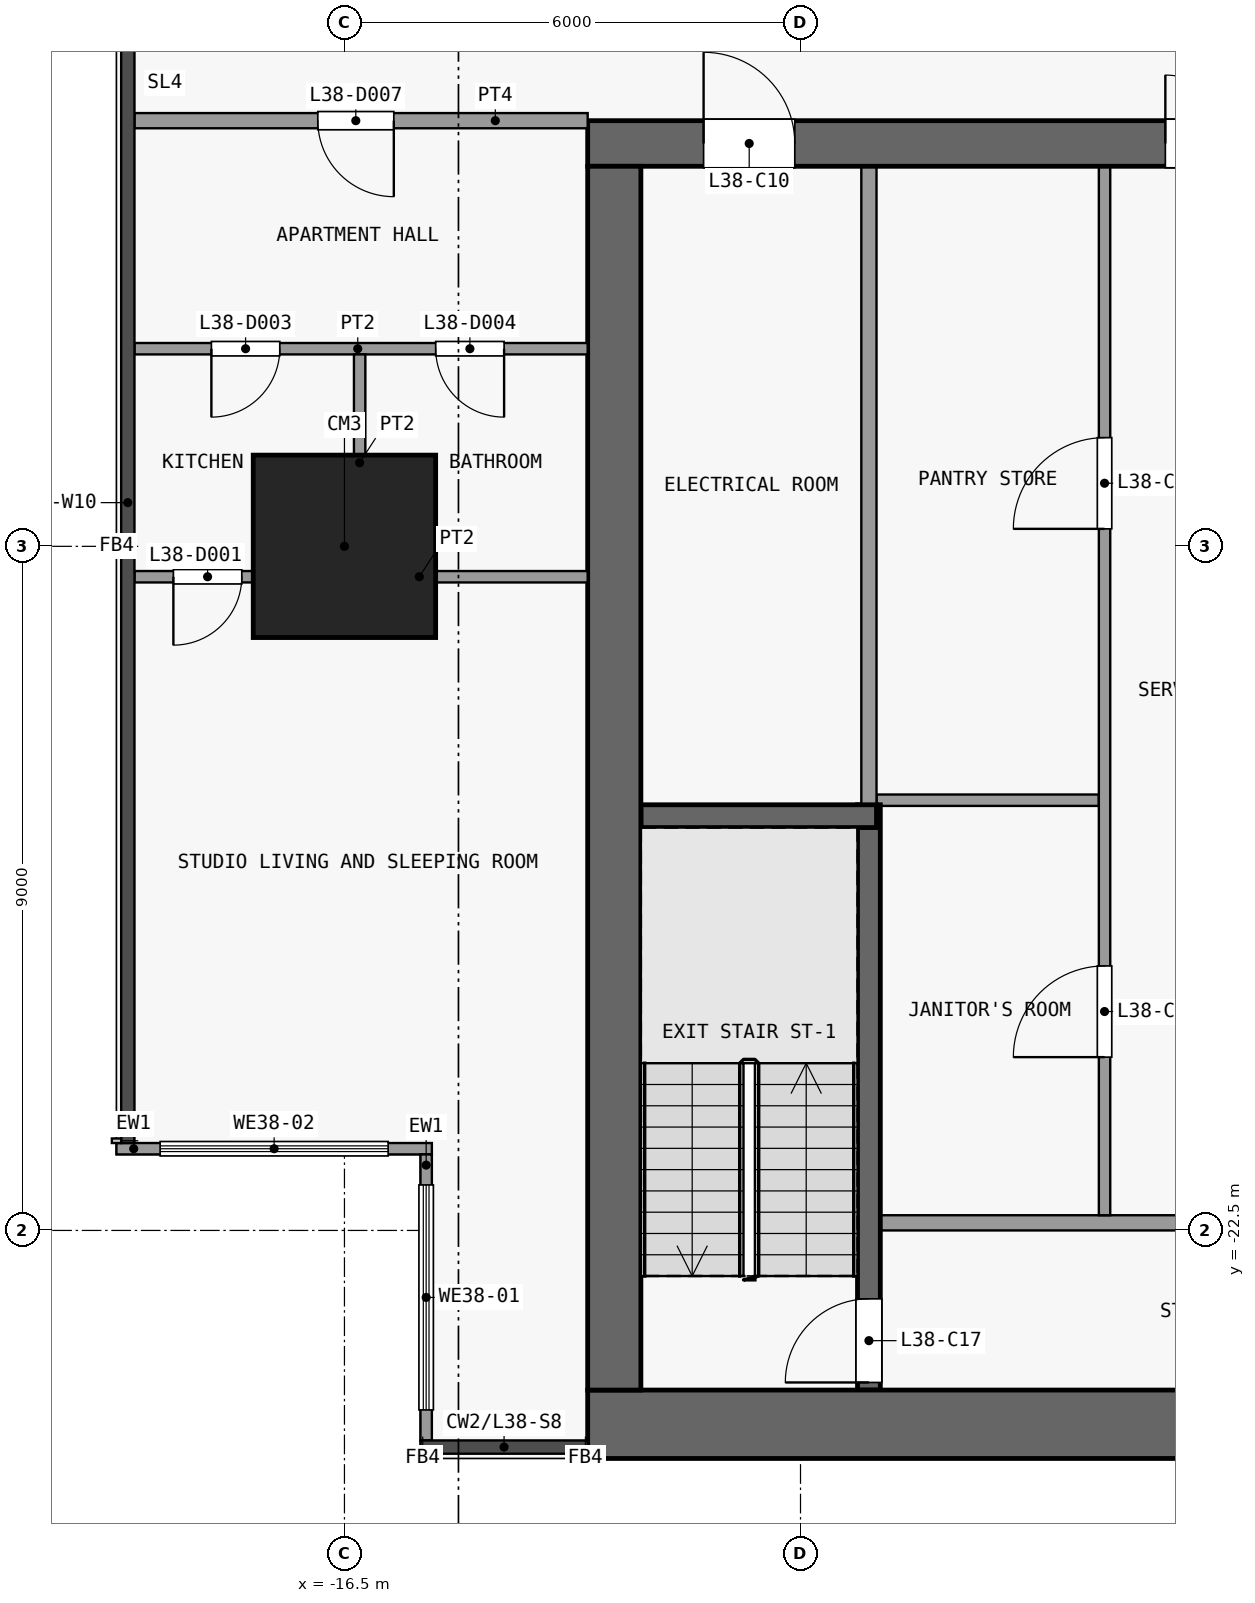
"""IFC4 building model, lengths in metres.
Left out: names, types, materials, properties, quantities, classifications, styles, units other than length and angle.
Written with IfcOpenShell. Run it as: python <this file> out.ifc"""

import sys

from ifc_helpers import new_model, si_unit, direction, frame, frame_2d, origin, origin_2d, place, context, subcontext, project, spatial, rectangle, extrude, element, fill, save


model = new_model("IFC4")
c1 = context("Model", 3, precision=1e-05, world=origin(), true_north=direction((0.0, 1.0)))
c2 = subcontext(c1, "Body", "Model", "MODEL_VIEW")
j1 = project(units=[si_unit("LENGTHUNIT", "METRE"), si_unit("PLANEANGLEUNIT", "RADIAN")], contexts=[c1])
p1 = place(None, origin())
s1 = spatial("IfcSite", under=j1, at=p1, CompositionType="ELEMENT")
p2 = place(p1, origin())
s2 = spatial("IfcBuilding", under=s1, at=p2, CompositionType="ELEMENT")
p3 = place(p2, frame((0.0, 0.0, 156.5)))
s3 = spatial("IfcBuildingStorey", under=s2, at=p3, CompositionType="ELEMENT", Elevation=156.5)
p4 = place(p3, frame((-16.5, -13.5, 0.0), z_axis=(0.0, 0.0, 1.0), x_axis=(1.0, 0.0, 0.0)))
e1 = element("IfcColumn", 1, at=p4, inside=s3, PredefinedType="COLUMN", context=c2, shape_type="SweptSolid", body=[
    extrude(rectangle(XDim=2.4, YDim=2.4, at=origin_2d()), origin(), (0.0, 0.0, 1.0), 3.6),
])
p5 = place(p3, frame((-13.3, -25.05, 0.0), z_axis=(0.0, 0.0, 1.0), x_axis=(1.0, 0.0, 0.0)))
e2 = element("IfcWall", 2, at=p5, inside=s3, PredefinedType="SHEAR", context=c2, shape_type="SweptSolid", body=[
    extrude(rectangle(XDim=26.6, YDim=0.9, at=frame_2d((13.3, 0.0))), origin(), (0.0, 0.0, 1.0), 3.3),
])
p6 = place(p3, frame((-13.3, -8.2, 0.0), z_axis=(0.0, 0.0, 1.0), x_axis=(1.0, 0.0, 0.0)))
e3 = element("IfcWall", 3, at=p6, inside=s3, PredefinedType="SHEAR", context=c2, shape_type="SweptSolid", body=[
    extrude(rectangle(XDim=26.6, YDim=0.6, at=frame_2d((13.3, 0.0))), origin(), (0.0, 0.0, 1.0), 3.3),
])
p7 = place(p6, frame((7.6, 0.0, 0.0)))
e4 = element("IfcOpeningElement", 4, at=p7, cuts=e3, PredefinedType="OPENING", context=c2, shape_type="SweptSolid", body=[
    extrude(rectangle(XDim=1.8, YDim=2.1, at=frame_2d((0.9, 1.05))), frame((0.0, 0.31, 0.0), z_axis=(0.0, -1.0, 0.0), x_axis=(1.0, 0.0, 0.0)), (0.0, 0.0, 1.0), 0.62),
])
p8 = place(p6, frame((17.2, 0.0, 0.0)))
e5 = element("IfcOpeningElement", 5, at=p8, cuts=e3, PredefinedType="OPENING", context=c2, shape_type="SweptSolid", body=[
    extrude(rectangle(XDim=1.8, YDim=2.1, at=frame_2d((0.9, 1.05))), frame((0.0, 0.31, 0.0), z_axis=(0.0, -1.0, 0.0), x_axis=(1.0, 0.0, 0.0)), (0.0, 0.0, 1.0), 0.62),
])
p9 = place(p6, frame((1.525, 0.0, 0.0)))
e6 = element("IfcOpeningElement", 6, at=p9, cuts=e3, PredefinedType="OPENING", context=c2, shape_type="SweptSolid", body=[
    extrude(rectangle(XDim=1.2, YDim=2.1, at=frame_2d((0.6, 1.05))), frame((0.0, 0.31, 0.0), z_axis=(0.0, -1.0, 0.0), x_axis=(1.0, 0.0, 0.0)), (0.0, 0.0, 1.0), 0.62),
])
p10 = place(p6, frame((23.175, 0.0, 0.0)))
e7 = element("IfcOpeningElement", 7, at=p10, cuts=e3, PredefinedType="OPENING", context=c2, shape_type="SweptSolid", body=[
    extrude(rectangle(XDim=0.9, YDim=2.1, at=frame_2d((0.45, 1.05))), frame((0.0, 0.31, 0.0), z_axis=(0.0, -1.0, 0.0), x_axis=(1.0, 0.0, 0.0)), (0.0, 0.0, 1.0), 0.62),
])
p11 = place(p3, frame((-12.95, -24.6, 0.0), z_axis=(0.0, 0.0, 1.0), x_axis=(0.0, 1.0, 0.0)))
e8 = element("IfcWall", 8, at=p11, inside=s3, PredefinedType="SHEAR", context=c2, shape_type="SweptSolid", body=[
    extrude(rectangle(XDim=16.1, YDim=0.7, at=frame_2d((8.05, 0.0))), origin(), (0.0, 0.0, 1.0), 3.3),
])
p12 = place(p3, frame((-3.25, -22.4, 0.0), z_axis=(0.0, 0.0, 1.0), x_axis=(-1.0, 0.0, 0.0)))
e9 = element("IfcWall", 9, at=p12, inside=s3, PredefinedType="PARTITIONING", context=c2, shape_type="SweptSolid", body=[
    extrude(rectangle(XDim=6.2, YDim=0.2, at=frame_2d((3.1, 0.0))), origin(), (0.0, 0.0, 1.0), 3.3),
])
p13 = place(p12, frame((0.8, 0.0, 0.0)))
e10 = element("IfcOpeningElement", 10, at=p13, cuts=e9, PredefinedType="OPENING", context=c2, shape_type="SweptSolid", body=[
    extrude(rectangle(XDim=1.5, YDim=2.1, at=frame_2d((0.75, 1.05))), frame((0.0, 0.11, 0.0), z_axis=(0.0, -1.0, 0.0), x_axis=(1.0, 0.0, 0.0)), (0.0, 0.0, 1.0), 0.22),
])
p14 = place(p3, frame((-12.6, -17.05, 0.0), z_axis=(0.0, 0.0, 1.0), x_axis=(1.0, 0.0, 0.0)))
e11 = element("IfcWall", 11, at=p14, inside=s3, PredefinedType="SHEAR", context=c2, shape_type="SweptSolid", body=[
    extrude(rectangle(XDim=3.1, YDim=0.3, at=frame_2d((1.55, 0.0))), origin(), (0.0, 0.0, 1.0), 3.3),
])
p15 = place(p3, frame((-9.5, -16.84, 0.0), z_axis=(0.0, 0.0, 1.0), x_axis=(1.0, 0.0, 0.0)))
e12 = element("IfcWall", 12, at=p15, inside=s3, PredefinedType="PARTITIONING", context=c2, shape_type="SweptSolid", body=[
    extrude(rectangle(XDim=2.925, YDim=0.15, at=frame_2d((1.462, 0.0))), origin(), (0.0, 0.0, 1.0), 3.3),
])
p16 = place(p3, frame((-9.6, -24.6, 0.0), z_axis=(0.0, 0.0, 1.0), x_axis=(0.0, 1.0, 0.0)))
e13 = element("IfcWall", 13, at=p16, inside=s3, PredefinedType="SHEAR", context=c2, shape_type="SweptSolid", body=[
    extrude(rectangle(XDim=7.7, YDim=0.3, at=frame_2d((3.85, 0.0))), origin(), (0.0, 0.0, 1.0), 3.3),
])
p17 = place(p16, frame((0.1, 0.0, 0.0)))
e14 = element("IfcOpeningElement", 14, at=p17, cuts=e13, PredefinedType="OPENING", context=c2, shape_type="SweptSolid", body=[
    extrude(rectangle(XDim=1.1, YDim=2.1, at=frame_2d((0.55, 1.05))), frame((0.0, 0.16, 0.0), z_axis=(0.0, -1.0, 0.0), x_axis=(1.0, 0.0, 0.0)), (0.0, 0.0, 1.0), 0.32),
])
p18 = place(p3, frame((-9.6, -16.9, 0.0), z_axis=(0.0, 0.0, 1.0), x_axis=(0.0, 1.0, 0.0)))
e15 = element("IfcWall", 15, at=p18, inside=s3, PredefinedType="PARTITIONING", context=c2, shape_type="SweptSolid", body=[
    extrude(rectangle(XDim=8.4, YDim=0.2, at=frame_2d((4.2, 0.0))), origin(), (0.0, 0.0, 1.0), 3.3),
])
p19 = place(p3, frame((-6.5, -22.3, 0.0), z_axis=(0.0, 0.0, 1.0), x_axis=(0.0, 1.0, 0.0)))
e16 = element("IfcWall", 16, at=p19, inside=s3, PredefinedType="PARTITIONING", context=c2, shape_type="SweptSolid", body=[
    extrude(rectangle(XDim=13.8, YDim=0.15, at=frame_2d((6.9, 0.0))), origin(), (0.0, 0.0, 1.0), 3.3),
])
p20 = place(p19, frame((2.08, 0.0, 0.0)))
e17 = element("IfcOpeningElement", 17, at=p20, cuts=e16, PredefinedType="OPENING", context=c2, shape_type="SweptSolid", body=[
    extrude(rectangle(XDim=1.2, YDim=2.1, at=frame_2d((0.6, 1.05))), frame((0.0, 0.085, 0.0), z_axis=(0.0, -1.0, 0.0), x_axis=(1.0, 0.0, 0.0)), (0.0, 0.0, 1.0), 0.17),
])
p21 = place(p19, frame((9.03, 0.0, 0.0)))
e18 = element("IfcOpeningElement", 18, at=p21, cuts=e16, PredefinedType="OPENING", context=c2, shape_type="SweptSolid", body=[
    extrude(rectangle(XDim=1.2, YDim=2.1, at=frame_2d((0.6, 1.05))), frame((0.0, 0.085, 0.0), z_axis=(0.0, -1.0, 0.0), x_axis=(1.0, 0.0, 0.0)), (0.0, 0.0, 1.0), 0.17),
])
p22 = place(p3, frame((-15.425, -25.262, 0.0), z_axis=(0.0, 0.0, 1.0), x_axis=(0.0, 1.0, 0.0)))
e19 = element("IfcWall", 19, at=p22, inside=s3, PredefinedType="SOLIDWALL", context=c2, shape_type="SweptSolid", body=[
    extrude(rectangle(XDim=3.762, YDim=0.15, at=frame_2d((1.881, 0.0))), origin(), (0.0, 0.0, 1.0), 3.3),
])
p23 = place(p22, frame((0.401, 0.0, 0.9)))
e20 = element("IfcOpeningElement", 20, at=p23, cuts=e19, PredefinedType="OPENING", context=c2, shape_type="SweptSolid", body=[
    extrude(rectangle(XDim=2.96, YDim=2.4, at=frame_2d((1.48, 1.2))), frame((0.0, 0.085, 0.0), z_axis=(0.0, -1.0, 0.0), x_axis=(1.0, 0.0, 0.0)), (0.0, 0.0, 1.0), 0.17),
])
p24 = place(p3, frame((-15.35, -21.425, 0.0), z_axis=(0.0, 0.0, 1.0), x_axis=(-1.0, 0.0, 0.0)))
e21 = element("IfcWall", 21, at=p24, inside=s3, PredefinedType="SOLIDWALL", context=c2, shape_type="SweptSolid", body=[
    extrude(rectangle(XDim=4.15, YDim=0.15, at=frame_2d((2.075, 0.0))), origin(), (0.0, 0.0, 1.0), 3.3),
])
p25 = place(p24, frame((0.575, 0.0, 0.9)))
e22 = element("IfcOpeningElement", 22, at=p25, cuts=e21, PredefinedType="OPENING", context=c2, shape_type="SweptSolid", body=[
    extrude(rectangle(XDim=3.0, YDim=2.4, at=frame_2d((1.5, 1.2))), frame((0.0, 0.085, 0.0), z_axis=(0.0, -1.0, 0.0), x_axis=(1.0, 0.0, 0.0)), (0.0, 0.0, 1.0), 0.17),
])
p26 = place(p3, frame((-19.262, -13.9, 0.0), z_axis=(0.0, 0.0, 1.0), x_axis=(1.0, 0.0, 0.0)))
e23 = element("IfcWall", 23, at=p26, inside=s3, PredefinedType="PARTITIONING", context=c2, shape_type="SweptSolid", body=[
    extrude(rectangle(XDim=5.962, YDim=0.15, at=frame_2d((2.981, 0.0))), origin(), (0.0, 0.0, 1.0), 3.3),
])
p27 = place(p26, frame((0.512, 0.0, 0.0)))
e24 = element("IfcOpeningElement", 24, at=p27, cuts=e23, PredefinedType="OPENING", context=c2, shape_type="SweptSolid", body=[
    extrude(rectangle(XDim=0.9, YDim=2.1, at=frame_2d((0.45, 1.05))), frame((0.0, 0.085, 0.0), z_axis=(0.0, -1.0, 0.0), x_axis=(1.0, 0.0, 0.0)), (0.0, 0.0, 1.0), 0.17),
])
p28 = place(p3, frame((-19.262, -10.9, 0.0), z_axis=(0.0, 0.0, 1.0), x_axis=(1.0, 0.0, 0.0)))
e25 = element("IfcWall", 25, at=p28, inside=s3, PredefinedType="PARTITIONING", context=c2, shape_type="SweptSolid", body=[
    extrude(rectangle(XDim=5.962, YDim=0.15, at=frame_2d((2.981, 0.0))), origin(), (0.0, 0.0, 1.0), 3.3),
])
p29 = place(p28, frame((1.012, 0.0, 0.0)))
e26 = element("IfcOpeningElement", 26, at=p29, cuts=e25, PredefinedType="OPENING", context=c2, shape_type="SweptSolid", body=[
    extrude(rectangle(XDim=0.9, YDim=2.1, at=frame_2d((0.45, 1.05))), frame((0.0, 0.085, 0.0), z_axis=(0.0, -1.0, 0.0), x_axis=(1.0, 0.0, 0.0)), (0.0, 0.0, 1.0), 0.17),
])
p30 = place(p28, frame((3.963, 0.0, 0.0)))
e27 = element("IfcOpeningElement", 27, at=p30, cuts=e25, PredefinedType="OPENING", context=c2, shape_type="SweptSolid", body=[
    extrude(rectangle(XDim=0.9, YDim=2.1, at=frame_2d((0.45, 1.05))), frame((0.0, 0.085, 0.0), z_axis=(0.0, -1.0, 0.0), x_axis=(1.0, 0.0, 0.0)), (0.0, 0.0, 1.0), 0.17),
])
p31 = place(p3, frame((-19.262, -7.9, 0.0), z_axis=(0.0, 0.0, 1.0), x_axis=(1.0, 0.0, 0.0)))
e28 = element("IfcWall", 28, at=p31, inside=s3, PredefinedType="PARTITIONING", context=c2, shape_type="SweptSolid", body=[
    extrude(rectangle(XDim=5.962, YDim=0.2, at=frame_2d((2.981, 0.0))), origin(), (0.0, 0.0, 1.0), 3.3),
])
p32 = place(p31, frame((2.412, 0.0, 0.0)))
e29 = element("IfcOpeningElement", 29, at=p32, cuts=e28, PredefinedType="OPENING", context=c2, shape_type="SweptSolid", body=[
    extrude(rectangle(XDim=1.0, YDim=2.1, at=frame_2d((0.5, 1.05))), frame((0.0, 0.11, 0.0), z_axis=(0.0, -1.0, 0.0), x_axis=(1.0, 0.0, 0.0)), (0.0, 0.0, 1.0), 0.22),
])
p33 = place(p3, frame((-16.3, -13.825, 0.0), z_axis=(0.0, 0.0, 1.0), x_axis=(0.0, 1.0, 0.0)))
e30 = element("IfcWall", 30, at=p33, inside=s3, PredefinedType="PARTITIONING", context=c2, shape_type="SweptSolid", body=[
    extrude(rectangle(XDim=2.85, YDim=0.15, at=frame_2d((1.425, 0.0))), origin(), (0.0, 0.0, 1.0), 3.3),
])
p34 = place(p7, origin())
e31 = element("IfcDoor", 31, at=p34, inside=s3, OperationType="DOUBLE_DOOR_SINGLE_SWING", PredefinedType="DOOR", context=c2, shape_type="SweptSolid", body=[
    extrude(rectangle(XDim=1.8, YDim=2.1, at=frame_2d((0.9, 1.05))), frame((0.0, 0.025, 0.0), z_axis=(0.0, -1.0, 0.0), x_axis=(1.0, 0.0, 0.0)), (0.0, 0.0, 1.0), 0.05),
])
fill(e4, e31)
p35 = place(p9, origin())
e32 = element("IfcDoor", 32, at=p35, inside=s3, OperationType="SINGLE_SWING_LEFT", PredefinedType="DOOR", context=c2, shape_type="SweptSolid", body=[
    extrude(rectangle(XDim=1.2, YDim=2.1, at=frame_2d((0.6, 1.05))), frame((0.0, 0.025, 0.0), z_axis=(0.0, -1.0, 0.0), x_axis=(1.0, 0.0, 0.0)), (0.0, 0.0, 1.0), 0.05),
])
fill(e6, e32)
p36 = place(p20, origin())
e33 = element("IfcDoor", 33, at=p36, inside=s3, OperationType="SINGLE_SWING_LEFT", PredefinedType="DOOR", context=c2, shape_type="SweptSolid", body=[
    extrude(rectangle(XDim=1.2, YDim=2.1, at=frame_2d((0.6, 1.05))), frame((0.0, 0.025, 0.0), z_axis=(0.0, -1.0, 0.0), x_axis=(1.0, 0.0, 0.0)), (0.0, 0.0, 1.0), 0.05),
])
fill(e17, e33)
p37 = place(p21, origin())
e34 = element("IfcDoor", 34, at=p37, inside=s3, OperationType="SINGLE_SWING_LEFT", PredefinedType="DOOR", context=c2, shape_type="SweptSolid", body=[
    extrude(rectangle(XDim=1.2, YDim=2.1, at=frame_2d((0.6, 1.05))), frame((0.0, 0.025, 0.0), z_axis=(0.0, -1.0, 0.0), x_axis=(1.0, 0.0, 0.0)), (0.0, 0.0, 1.0), 0.05),
])
fill(e18, e34)
p38 = place(p17, origin())
e35 = element("IfcDoor", 35, at=p38, inside=s3, OperationType="SINGLE_SWING_LEFT", PredefinedType="DOOR", context=c2, shape_type="SweptSolid", body=[
    extrude(rectangle(XDim=1.1, YDim=2.1, at=frame_2d((0.55, 1.05))), frame((0.0, 0.025, 0.0), z_axis=(0.0, -1.0, 0.0), x_axis=(1.0, 0.0, 0.0)), (0.0, 0.0, 1.0), 0.05),
])
fill(e14, e35)
p39 = place(p23, origin())
e36 = element("IfcWindow", 36, at=p39, inside=s3, PartitioningType="SINGLE_PANEL", PredefinedType="WINDOW", context=c2, shape_type="SweptSolid", body=[
    extrude(rectangle(XDim=2.96, YDim=2.4, at=frame_2d((1.48, 1.2))), frame((0.0, 0.03, 0.0), z_axis=(0.0, -1.0, 0.0), x_axis=(1.0, 0.0, 0.0)), (0.0, 0.0, 1.0), 0.06),
])
fill(e20, e36)
p40 = place(p25, origin())
e37 = element("IfcWindow", 37, at=p40, inside=s3, PartitioningType="SINGLE_PANEL", PredefinedType="WINDOW", context=c2, shape_type="SweptSolid", body=[
    extrude(rectangle(XDim=3.0, YDim=2.4, at=frame_2d((1.5, 1.2))), frame((0.0, 0.03, 0.0), z_axis=(0.0, -1.0, 0.0), x_axis=(1.0, 0.0, 0.0)), (0.0, 0.0, 1.0), 0.06),
])
fill(e22, e37)
p41 = place(p27, origin())
e38 = element("IfcDoor", 38, at=p41, inside=s3, OperationType="SINGLE_SWING_LEFT", PredefinedType="DOOR", context=c2, shape_type="SweptSolid", body=[
    extrude(rectangle(XDim=0.9, YDim=2.1, at=frame_2d((0.45, 1.05))), frame((0.0, 0.025, 0.0), z_axis=(0.0, -1.0, 0.0), x_axis=(1.0, 0.0, 0.0)), (0.0, 0.0, 1.0), 0.05),
])
fill(e24, e38)
p42 = place(p29, origin())
e39 = element("IfcDoor", 39, at=p42, inside=s3, OperationType="SINGLE_SWING_LEFT", PredefinedType="DOOR", context=c2, shape_type="SweptSolid", body=[
    extrude(rectangle(XDim=0.9, YDim=2.1, at=frame_2d((0.45, 1.05))), frame((0.0, 0.025, 0.0), z_axis=(0.0, -1.0, 0.0), x_axis=(1.0, 0.0, 0.0)), (0.0, 0.0, 1.0), 0.05),
])
fill(e26, e39)
p43 = place(p30, origin())
e40 = element("IfcDoor", 40, at=p43, inside=s3, OperationType="SINGLE_SWING_RIGHT", PredefinedType="DOOR", context=c2, shape_type="SweptSolid", body=[
    extrude(rectangle(XDim=0.9, YDim=2.1, at=frame_2d((0.45, 1.05))), frame((0.0, 0.025, 0.0), z_axis=(0.0, -1.0, 0.0), x_axis=(1.0, 0.0, 0.0)), (0.0, 0.0, 1.0), 0.05),
])
fill(e27, e40)
p44 = place(p32, origin())
e41 = element("IfcDoor", 41, at=p44, inside=s3, OperationType="SINGLE_SWING_RIGHT", PredefinedType="DOOR", context=c2, shape_type="SweptSolid", body=[
    extrude(rectangle(XDim=1.0, YDim=2.1, at=frame_2d((0.5, 1.05))), frame((0.0, 0.025, 0.0), z_axis=(0.0, -1.0, 0.0), x_axis=(1.0, 0.0, 0.0)), (0.0, 0.0, 1.0), 0.05),
])
fill(e29, e41)
save(model, sys.argv[1])
